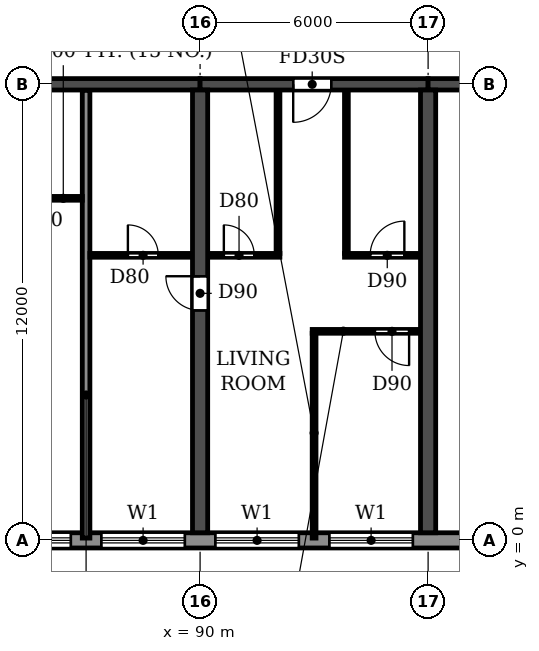
"""IFC4 building model, lengths in metres.
Left out: names, types, materials, properties, quantities, classifications, styles, units other than length and angle.
Written with IfcOpenShell. Run it as: python <this file> out.ifc"""

import sys

from ifc_helpers import new_model, si_unit, direction, frame, frame_2d, origin, place, context, subcontext, project, spatial, rectangle, extrude, element, fill, save


model = new_model("IFC4")
c1 = context("Model", 3, precision=1e-05, world=origin(), true_north=direction((0.0, 1.0)))
c2 = subcontext(c1, "Body", "Model", "MODEL_VIEW")
j1 = project(units=[si_unit("LENGTHUNIT", "METRE"), si_unit("PLANEANGLEUNIT", "RADIAN")], contexts=[c1])
p1 = place(None, origin())
s1 = spatial("IfcSite", under=j1, at=p1, CompositionType="ELEMENT")
p2 = place(p1, origin())
s2 = spatial("IfcBuilding", under=s1, at=p2, CompositionType="ELEMENT")
p3 = place(p2, frame((0.0, 0.0, 33.3)))
s3 = spatial("IfcBuildingStorey", under=s2, at=p3, CompositionType="ELEMENT", Elevation=33.3)
p4 = place(p3, frame((90.0, 0.2, 0.0), z_axis=(0.0, 0.0, 1.0), x_axis=(0.0, 1.0, 0.0)))
e1 = element("IfcWall", 1, at=p4, inside=s3, PredefinedType="SHEAR", context=c2, shape_type="SweptSolid", body=[
    extrude(rectangle(XDim=11.65, YDim=0.4, at=frame_2d((5.825, 0.0))), origin(), (0.0, 0.0, 1.0), 3.05),
])
p5 = place(p4, frame((5.85, 0.0, 0.0)))
e2 = element("IfcOpeningElement", 2, at=p5, cuts=e1, PredefinedType="OPENING", context=c2, shape_type="SweptSolid", body=[
    extrude(rectangle(XDim=0.9, YDim=2.1, at=frame_2d((0.45, 1.05))), frame((0.0, 0.21, 0.0), z_axis=(0.0, -1.0, 0.0), x_axis=(1.0, 0.0, 0.0)), (0.0, 0.0, 1.0), 0.42),
])
p6 = place(p3, frame((96.0, 0.2, 0.0), z_axis=(0.0, 0.0, 1.0), x_axis=(0.0, 1.0, 0.0)))
e3 = element("IfcWall", 3, at=p6, inside=s3, PredefinedType="SHEAR", context=c2, shape_type="SweptSolid", body=[
    extrude(rectangle(XDim=11.65, YDim=0.4, at=frame_2d((5.825, 0.0))), origin(), (0.0, 0.0, 1.0), 3.05),
])
p7 = place(p3, frame((84.0, 12.0, 0.0), z_axis=(0.0, 0.0, 1.0), x_axis=(1.0, 0.0, 0.0)))
e4 = element("IfcWall", 4, at=p7, inside=s3, PredefinedType="SHEAR", context=c2, shape_type="SweptSolid", body=[
    extrude(rectangle(XDim=6.0, YDim=0.3, at=frame_2d((3.0, 0.0))), origin(), (0.0, 0.0, 1.0), 2.45),
])
p8 = place(p3, frame((90.0, 12.0, 0.0), z_axis=(0.0, 0.0, 1.0), x_axis=(1.0, 0.0, 0.0)))
e5 = element("IfcWall", 5, at=p8, inside=s3, PredefinedType="SHEAR", context=c2, shape_type="SweptSolid", body=[
    extrude(rectangle(XDim=6.0, YDim=0.3, at=frame_2d((3.0, 0.0))), origin(), (0.0, 0.0, 1.0), 2.45),
])
p9 = place(p8, frame((2.45, 0.0, 0.0)))
e6 = element("IfcOpeningElement", 6, at=p9, cuts=e5, PredefinedType="OPENING", context=c2, shape_type="SweptSolid", body=[
    extrude(rectangle(XDim=1.0, YDim=2.1, at=frame_2d((0.5, 1.05))), frame((0.0, 0.16, 0.0), z_axis=(0.0, -1.0, 0.0), x_axis=(1.0, 0.0, 0.0)), (0.0, 0.0, 1.0), 0.32),
])
p10 = place(p3, frame((96.0, 12.0, 0.0), z_axis=(0.0, 0.0, 1.0), x_axis=(1.0, 0.0, 0.0)))
e7 = element("IfcWall", 7, at=p10, inside=s3, PredefinedType="SHEAR", context=c2, shape_type="SweptSolid", body=[
    extrude(rectangle(XDim=5.8, YDim=0.3, at=frame_2d((2.9, 0.0))), origin(), (0.0, 0.0, 1.0), 2.45),
])
p11 = place(p10, frame((2.5, 0.0, 0.0)))
e8 = element("IfcOpeningElement", 8, at=p11, cuts=e7, PredefinedType="OPENING", context=c2, shape_type="SweptSolid", body=[
    extrude(rectangle(XDim=1.0, YDim=2.1, at=frame_2d((0.5, 1.05))), frame((0.0, 0.16, 0.0), z_axis=(0.0, -1.0, 0.0), x_axis=(1.0, 0.0, 0.0)), (0.0, 0.0, 1.0), 0.32),
])
p12 = place(p3, frame((4.683, 0.0, 0.0), z_axis=(0.0, 0.0, 1.0), x_axis=(1.0, 0.0, 0.0)))
e9 = element("IfcWall", 9, at=p12, inside=s3, PredefinedType="STANDARD", context=c2, shape_type="SweptSolid", body=[
    extrude(rectangle(XDim=92.634, YDim=0.4, at=frame_2d((46.317, 0.0))), origin(), (0.0, 0.0, 1.0), 3.05),
])
p13 = place(p12, frame((1.717, 0.0, 0.9)))
e10 = element("IfcOpeningElement", 10, at=p13, cuts=e9, PredefinedType="OPENING", context=c2, shape_type="SweptSolid", body=[
    extrude(rectangle(XDim=2.2, YDim=1.5, at=frame_2d((1.1, 0.75))), frame((0.0, 0.21, 0.0), z_axis=(0.0, -1.0, 0.0), x_axis=(1.0, 0.0, 0.0)), (0.0, 0.0, 1.0), 0.42),
])
p14 = place(p12, frame((4.717, 0.0, 0.9)))
e11 = element("IfcOpeningElement", 11, at=p14, cuts=e9, PredefinedType="OPENING", context=c2, shape_type="SweptSolid", body=[
    extrude(rectangle(XDim=2.2, YDim=1.5, at=frame_2d((1.1, 0.75))), frame((0.0, 0.21, 0.0), z_axis=(0.0, -1.0, 0.0), x_axis=(1.0, 0.0, 0.0)), (0.0, 0.0, 1.0), 0.42),
])
p15 = place(p12, frame((7.917, 0.0, 0.0)))
e12 = element("IfcOpeningElement", 12, at=p15, cuts=e9, PredefinedType="OPENING", context=c2, shape_type="SweptSolid", body=[
    extrude(rectangle(XDim=1.8, YDim=2.4, at=frame_2d((0.9, 1.2))), frame((0.0, 0.21, 0.0), z_axis=(0.0, -1.0, 0.0), x_axis=(1.0, 0.0, 0.0)), (0.0, 0.0, 1.0), 0.42),
])
p16 = place(p12, frame((10.717, 0.0, 0.9)))
e13 = element("IfcOpeningElement", 13, at=p16, cuts=e9, PredefinedType="OPENING", context=c2, shape_type="SweptSolid", body=[
    extrude(rectangle(XDim=2.2, YDim=1.5, at=frame_2d((1.1, 0.75))), frame((0.0, 0.21, 0.0), z_axis=(0.0, -1.0, 0.0), x_axis=(1.0, 0.0, 0.0)), (0.0, 0.0, 1.0), 0.42),
])
p17 = place(p12, frame((13.717, 0.0, 0.9)))
e14 = element("IfcOpeningElement", 14, at=p17, cuts=e9, PredefinedType="OPENING", context=c2, shape_type="SweptSolid", body=[
    extrude(rectangle(XDim=2.2, YDim=1.5, at=frame_2d((1.1, 0.75))), frame((0.0, 0.21, 0.0), z_axis=(0.0, -1.0, 0.0), x_axis=(1.0, 0.0, 0.0)), (0.0, 0.0, 1.0), 0.42),
])
p18 = place(p12, frame((16.717, 0.0, 0.9)))
e15 = element("IfcOpeningElement", 15, at=p18, cuts=e9, PredefinedType="OPENING", context=c2, shape_type="SweptSolid", body=[
    extrude(rectangle(XDim=2.2, YDim=1.5, at=frame_2d((1.1, 0.75))), frame((0.0, 0.21, 0.0), z_axis=(0.0, -1.0, 0.0), x_axis=(1.0, 0.0, 0.0)), (0.0, 0.0, 1.0), 0.42),
])
p19 = place(p12, frame((19.717, 0.0, 0.9)))
e16 = element("IfcOpeningElement", 16, at=p19, cuts=e9, PredefinedType="OPENING", context=c2, shape_type="SweptSolid", body=[
    extrude(rectangle(XDim=2.2, YDim=1.5, at=frame_2d((1.1, 0.75))), frame((0.0, 0.21, 0.0), z_axis=(0.0, -1.0, 0.0), x_axis=(1.0, 0.0, 0.0)), (0.0, 0.0, 1.0), 0.42),
])
p20 = place(p12, frame((22.917, 0.0, 0.0)))
e17 = element("IfcOpeningElement", 17, at=p20, cuts=e9, PredefinedType="OPENING", context=c2, shape_type="SweptSolid", body=[
    extrude(rectangle(XDim=1.8, YDim=2.4, at=frame_2d((0.9, 1.2))), frame((0.0, 0.21, 0.0), z_axis=(0.0, -1.0, 0.0), x_axis=(1.0, 0.0, 0.0)), (0.0, 0.0, 1.0), 0.42),
])
p21 = place(p12, frame((25.717, 0.0, 0.9)))
e18 = element("IfcOpeningElement", 18, at=p21, cuts=e9, PredefinedType="OPENING", context=c2, shape_type="SweptSolid", body=[
    extrude(rectangle(XDim=2.2, YDim=1.5, at=frame_2d((1.1, 0.75))), frame((0.0, 0.21, 0.0), z_axis=(0.0, -1.0, 0.0), x_axis=(1.0, 0.0, 0.0)), (0.0, 0.0, 1.0), 0.42),
])
p22 = place(p12, frame((28.717, 0.0, 0.9)))
e19 = element("IfcOpeningElement", 19, at=p22, cuts=e9, PredefinedType="OPENING", context=c2, shape_type="SweptSolid", body=[
    extrude(rectangle(XDim=2.2, YDim=1.5, at=frame_2d((1.1, 0.75))), frame((0.0, 0.21, 0.0), z_axis=(0.0, -1.0, 0.0), x_axis=(1.0, 0.0, 0.0)), (0.0, 0.0, 1.0), 0.42),
])
p23 = place(p12, frame((31.717, 0.0, 0.9)))
e20 = element("IfcOpeningElement", 20, at=p23, cuts=e9, PredefinedType="OPENING", context=c2, shape_type="SweptSolid", body=[
    extrude(rectangle(XDim=2.2, YDim=1.5, at=frame_2d((1.1, 0.75))), frame((0.0, 0.21, 0.0), z_axis=(0.0, -1.0, 0.0), x_axis=(1.0, 0.0, 0.0)), (0.0, 0.0, 1.0), 0.42),
])
p24 = place(p12, frame((34.717, 0.0, 0.9)))
e21 = element("IfcOpeningElement", 21, at=p24, cuts=e9, PredefinedType="OPENING", context=c2, shape_type="SweptSolid", body=[
    extrude(rectangle(XDim=2.2, YDim=1.5, at=frame_2d((1.1, 0.75))), frame((0.0, 0.21, 0.0), z_axis=(0.0, -1.0, 0.0), x_axis=(1.0, 0.0, 0.0)), (0.0, 0.0, 1.0), 0.42),
])
p25 = place(p12, frame((37.717, 0.0, 0.9)))
e22 = element("IfcOpeningElement", 22, at=p25, cuts=e9, PredefinedType="OPENING", context=c2, shape_type="SweptSolid", body=[
    extrude(rectangle(XDim=2.2, YDim=1.5, at=frame_2d((1.1, 0.75))), frame((0.0, 0.21, 0.0), z_axis=(0.0, -1.0, 0.0), x_axis=(1.0, 0.0, 0.0)), (0.0, 0.0, 1.0), 0.42),
])
p26 = place(p12, frame((40.717, 0.0, 0.9)))
e23 = element("IfcOpeningElement", 23, at=p26, cuts=e9, PredefinedType="OPENING", context=c2, shape_type="SweptSolid", body=[
    extrude(rectangle(XDim=2.2, YDim=1.5, at=frame_2d((1.1, 0.75))), frame((0.0, 0.21, 0.0), z_axis=(0.0, -1.0, 0.0), x_axis=(1.0, 0.0, 0.0)), (0.0, 0.0, 1.0), 0.42),
])
p27 = place(p12, frame((43.717, 0.0, 0.9)))
e24 = element("IfcOpeningElement", 24, at=p27, cuts=e9, PredefinedType="OPENING", context=c2, shape_type="SweptSolid", body=[
    extrude(rectangle(XDim=2.2, YDim=1.5, at=frame_2d((1.1, 0.75))), frame((0.0, 0.21, 0.0), z_axis=(0.0, -1.0, 0.0), x_axis=(1.0, 0.0, 0.0)), (0.0, 0.0, 1.0), 0.42),
])
p28 = place(p12, frame((46.917, 0.0, 0.0)))
e25 = element("IfcOpeningElement", 25, at=p28, cuts=e9, PredefinedType="OPENING", context=c2, shape_type="SweptSolid", body=[
    extrude(rectangle(XDim=1.8, YDim=2.4, at=frame_2d((0.9, 1.2))), frame((0.0, 0.21, 0.0), z_axis=(0.0, -1.0, 0.0), x_axis=(1.0, 0.0, 0.0)), (0.0, 0.0, 1.0), 0.42),
])
p29 = place(p12, frame((49.717, 0.0, 0.9)))
e26 = element("IfcOpeningElement", 26, at=p29, cuts=e9, PredefinedType="OPENING", context=c2, shape_type="SweptSolid", body=[
    extrude(rectangle(XDim=2.2, YDim=1.5, at=frame_2d((1.1, 0.75))), frame((0.0, 0.21, 0.0), z_axis=(0.0, -1.0, 0.0), x_axis=(1.0, 0.0, 0.0)), (0.0, 0.0, 1.0), 0.42),
])
p30 = place(p12, frame((52.717, 0.0, 0.9)))
e27 = element("IfcOpeningElement", 27, at=p30, cuts=e9, PredefinedType="OPENING", context=c2, shape_type="SweptSolid", body=[
    extrude(rectangle(XDim=2.2, YDim=1.5, at=frame_2d((1.1, 0.75))), frame((0.0, 0.21, 0.0), z_axis=(0.0, -1.0, 0.0), x_axis=(1.0, 0.0, 0.0)), (0.0, 0.0, 1.0), 0.42),
])
p31 = place(p12, frame((55.717, 0.0, 0.9)))
e28 = element("IfcOpeningElement", 28, at=p31, cuts=e9, PredefinedType="OPENING", context=c2, shape_type="SweptSolid", body=[
    extrude(rectangle(XDim=2.2, YDim=1.5, at=frame_2d((1.1, 0.75))), frame((0.0, 0.21, 0.0), z_axis=(0.0, -1.0, 0.0), x_axis=(1.0, 0.0, 0.0)), (0.0, 0.0, 1.0), 0.42),
])
p32 = place(p12, frame((58.917, 0.0, 0.0)))
e29 = element("IfcOpeningElement", 29, at=p32, cuts=e9, PredefinedType="OPENING", context=c2, shape_type="SweptSolid", body=[
    extrude(rectangle(XDim=1.8, YDim=2.4, at=frame_2d((0.9, 1.2))), frame((0.0, 0.21, 0.0), z_axis=(0.0, -1.0, 0.0), x_axis=(1.0, 0.0, 0.0)), (0.0, 0.0, 1.0), 0.42),
])
p33 = place(p12, frame((61.717, 0.0, 0.9)))
e30 = element("IfcOpeningElement", 30, at=p33, cuts=e9, PredefinedType="OPENING", context=c2, shape_type="SweptSolid", body=[
    extrude(rectangle(XDim=2.2, YDim=1.5, at=frame_2d((1.1, 0.75))), frame((0.0, 0.21, 0.0), z_axis=(0.0, -1.0, 0.0), x_axis=(1.0, 0.0, 0.0)), (0.0, 0.0, 1.0), 0.42),
])
p34 = place(p12, frame((64.717, 0.0, 0.9)))
e31 = element("IfcOpeningElement", 31, at=p34, cuts=e9, PredefinedType="OPENING", context=c2, shape_type="SweptSolid", body=[
    extrude(rectangle(XDim=2.2, YDim=1.5, at=frame_2d((1.1, 0.75))), frame((0.0, 0.21, 0.0), z_axis=(0.0, -1.0, 0.0), x_axis=(1.0, 0.0, 0.0)), (0.0, 0.0, 1.0), 0.42),
])
p35 = place(p12, frame((67.717, 0.0, 0.9)))
e32 = element("IfcOpeningElement", 32, at=p35, cuts=e9, PredefinedType="OPENING", context=c2, shape_type="SweptSolid", body=[
    extrude(rectangle(XDim=2.2, YDim=1.5, at=frame_2d((1.1, 0.75))), frame((0.0, 0.21, 0.0), z_axis=(0.0, -1.0, 0.0), x_axis=(1.0, 0.0, 0.0)), (0.0, 0.0, 1.0), 0.42),
])
p36 = place(p12, frame((70.917, 0.0, 0.0)))
e33 = element("IfcOpeningElement", 33, at=p36, cuts=e9, PredefinedType="OPENING", context=c2, shape_type="SweptSolid", body=[
    extrude(rectangle(XDim=1.8, YDim=2.4, at=frame_2d((0.9, 1.2))), frame((0.0, 0.21, 0.0), z_axis=(0.0, -1.0, 0.0), x_axis=(1.0, 0.0, 0.0)), (0.0, 0.0, 1.0), 0.42),
])
p37 = place(p12, frame((73.717, 0.0, 0.9)))
e34 = element("IfcOpeningElement", 34, at=p37, cuts=e9, PredefinedType="OPENING", context=c2, shape_type="SweptSolid", body=[
    extrude(rectangle(XDim=2.2, YDim=1.5, at=frame_2d((1.1, 0.75))), frame((0.0, 0.21, 0.0), z_axis=(0.0, -1.0, 0.0), x_axis=(1.0, 0.0, 0.0)), (0.0, 0.0, 1.0), 0.42),
])
p38 = place(p12, frame((76.717, 0.0, 0.9)))
e35 = element("IfcOpeningElement", 35, at=p38, cuts=e9, PredefinedType="OPENING", context=c2, shape_type="SweptSolid", body=[
    extrude(rectangle(XDim=2.2, YDim=1.5, at=frame_2d((1.1, 0.75))), frame((0.0, 0.21, 0.0), z_axis=(0.0, -1.0, 0.0), x_axis=(1.0, 0.0, 0.0)), (0.0, 0.0, 1.0), 0.42),
])
p39 = place(p12, frame((79.717, 0.0, 0.9)))
e36 = element("IfcOpeningElement", 36, at=p39, cuts=e9, PredefinedType="OPENING", context=c2, shape_type="SweptSolid", body=[
    extrude(rectangle(XDim=2.2, YDim=1.5, at=frame_2d((1.1, 0.75))), frame((0.0, 0.21, 0.0), z_axis=(0.0, -1.0, 0.0), x_axis=(1.0, 0.0, 0.0)), (0.0, 0.0, 1.0), 0.42),
])
p40 = place(p12, frame((82.717, 0.0, 0.9)))
e37 = element("IfcOpeningElement", 37, at=p40, cuts=e9, PredefinedType="OPENING", context=c2, shape_type="SweptSolid", body=[
    extrude(rectangle(XDim=2.2, YDim=1.5, at=frame_2d((1.1, 0.75))), frame((0.0, 0.21, 0.0), z_axis=(0.0, -1.0, 0.0), x_axis=(1.0, 0.0, 0.0)), (0.0, 0.0, 1.0), 0.42),
])
p41 = place(p12, frame((85.717, 0.0, 0.9)))
e38 = element("IfcOpeningElement", 38, at=p41, cuts=e9, PredefinedType="OPENING", context=c2, shape_type="SweptSolid", body=[
    extrude(rectangle(XDim=2.2, YDim=1.5, at=frame_2d((1.1, 0.75))), frame((0.0, 0.21, 0.0), z_axis=(0.0, -1.0, 0.0), x_axis=(1.0, 0.0, 0.0)), (0.0, 0.0, 1.0), 0.42),
])
p42 = place(p12, frame((88.717, 0.0, 0.9)))
e39 = element("IfcOpeningElement", 39, at=p42, cuts=e9, PredefinedType="OPENING", context=c2, shape_type="SweptSolid", body=[
    extrude(rectangle(XDim=2.2, YDim=1.5, at=frame_2d((1.1, 0.75))), frame((0.0, 0.21, 0.0), z_axis=(0.0, -1.0, 0.0), x_axis=(1.0, 0.0, 0.0)), (0.0, 0.0, 1.0), 0.42),
])
p43 = place(p3, frame((87.0, 0.06, 0.0), z_axis=(0.0, 0.0, 1.0), x_axis=(0.0, 1.0, 0.0)))
e40 = element("IfcWall", 40, at=p43, inside=s3, PredefinedType="PARTITIONING", context=c2, shape_type="SweptSolid", body=[
    extrude(rectangle(XDim=11.78, YDim=0.2, at=frame_2d((5.89, 0.0))), origin(), (0.0, 0.0, 1.0), 3.05),
])
p44 = place(p3, frame((92.95, 5.5, 0.0), z_axis=(0.0, 0.0, 1.0), x_axis=(1.0, 0.0, 0.0)))
e41 = element("IfcWall", 41, at=p44, inside=s3, PredefinedType="PARTITIONING", context=c2, shape_type="SweptSolid", body=[
    extrude(rectangle(XDim=2.84, YDim=0.1, at=frame_2d((1.42, 0.0))), origin(), (0.0, 0.0, 1.0), 3.05),
])
p45 = place(p44, frame((1.65, 0.0, 0.0)))
e42 = element("IfcOpeningElement", 42, at=p45, cuts=e41, PredefinedType="OPENING", context=c2, shape_type="SweptSolid", body=[
    extrude(rectangle(XDim=0.9, YDim=2.1, at=frame_2d((0.45, 1.05))), frame((0.0, 0.06, 0.0), z_axis=(0.0, -1.0, 0.0), x_axis=(1.0, 0.0, 0.0)), (0.0, 0.0, 1.0), 0.12),
])
p46 = place(p3, frame((87.1, 7.5, 0.0), z_axis=(0.0, 0.0, 1.0), x_axis=(1.0, 0.0, 0.0)))
e43 = element("IfcWall", 43, at=p46, inside=s3, PredefinedType="PARTITIONING", context=c2, shape_type="SweptSolid", body=[
    extrude(rectangle(XDim=2.69, YDim=0.1, at=frame_2d((1.345, 0.0))), origin(), (0.0, 0.0, 1.0), 3.05),
])
p47 = place(p46, frame((1.0, 0.0, 0.0)))
e44 = element("IfcOpeningElement", 44, at=p47, cuts=e43, PredefinedType="OPENING", context=c2, shape_type="SweptSolid", body=[
    extrude(rectangle(XDim=0.8, YDim=2.1, at=frame_2d((0.4, 1.05))), frame((0.0, 0.06, 0.0), z_axis=(0.0, -1.0, 0.0), x_axis=(1.0, 0.0, 0.0)), (0.0, 0.0, 1.0), 0.12),
])
p48 = place(p3, frame((90.21, 7.5, 0.0), z_axis=(0.0, 0.0, 1.0), x_axis=(1.0, 0.0, 0.0)))
e45 = element("IfcWall", 45, at=p48, inside=s3, PredefinedType="PARTITIONING", context=c2, shape_type="SweptSolid", body=[
    extrude(rectangle(XDim=1.89, YDim=0.1, at=frame_2d((0.945, 0.0))), origin(), (0.0, 0.0, 1.0), 3.05),
])
p49 = place(p48, frame((0.415, 0.0, 0.0)))
e46 = element("IfcOpeningElement", 46, at=p49, cuts=e45, PredefinedType="OPENING", context=c2, shape_type="SweptSolid", body=[
    extrude(rectangle(XDim=0.8, YDim=2.1, at=frame_2d((0.4, 1.05))), frame((0.0, 0.06, 0.0), z_axis=(0.0, -1.0, 0.0), x_axis=(1.0, 0.0, 0.0)), (0.0, 0.0, 1.0), 0.12),
])
p50 = place(p3, frame((93.8, 7.5, 0.0), z_axis=(0.0, 0.0, 1.0), x_axis=(1.0, 0.0, 0.0)))
e47 = element("IfcWall", 47, at=p50, inside=s3, PredefinedType="PARTITIONING", context=c2, shape_type="SweptSolid", body=[
    extrude(rectangle(XDim=1.99, YDim=0.1, at=frame_2d((0.995, 0.0))), origin(), (0.0, 0.0, 1.0), 3.05),
])
p51 = place(p50, frame((0.675, 0.0, 0.0)))
e48 = element("IfcOpeningElement", 48, at=p51, cuts=e47, PredefinedType="OPENING", context=c2, shape_type="SweptSolid", body=[
    extrude(rectangle(XDim=0.9, YDim=2.1, at=frame_2d((0.45, 1.05))), frame((0.0, 0.06, 0.0), z_axis=(0.0, -1.0, 0.0), x_axis=(1.0, 0.0, 0.0)), (0.0, 0.0, 1.0), 0.12),
])
p52 = place(p3, frame((84.21, 9.0, 0.0), z_axis=(0.0, 0.0, 1.0), x_axis=(1.0, 0.0, 0.0)))
e49 = element("IfcWall", 49, at=p52, inside=s3, PredefinedType="PARTITIONING", context=c2, shape_type="SweptSolid", body=[
    extrude(rectangle(XDim=2.69, YDim=0.1, at=frame_2d((1.345, 0.0))), origin(), (0.0, 0.0, 1.0), 3.05),
])
p53 = place(p52, frame((0.89, 0.0, 0.0)))
e50 = element("IfcOpeningElement", 50, at=p53, cuts=e49, PredefinedType="OPENING", context=c2, shape_type="SweptSolid", body=[
    extrude(rectangle(XDim=0.8, YDim=2.1, at=frame_2d((0.4, 1.05))), frame((0.0, 0.06, 0.0), z_axis=(0.0, -1.0, 0.0), x_axis=(1.0, 0.0, 0.0)), (0.0, 0.0, 1.0), 0.12),
])
p54 = place(p3, frame((92.05, 7.55, 0.0), z_axis=(0.0, 0.0, 1.0), x_axis=(0.0, 1.0, 0.0)))
e51 = element("IfcWall", 51, at=p54, inside=s3, PredefinedType="PARTITIONING", context=c2, shape_type="SweptSolid", body=[
    extrude(rectangle(XDim=4.29, YDim=0.1, at=frame_2d((2.145, 0.0))), origin(), (0.0, 0.0, 1.0), 3.05),
])
p55 = place(p3, frame((93.0, 0.06, 0.0), z_axis=(0.0, 0.0, 1.0), x_axis=(0.0, 1.0, 0.0)))
e52 = element("IfcWall", 52, at=p55, inside=s3, PredefinedType="PARTITIONING", context=c2, shape_type="SweptSolid", body=[
    extrude(rectangle(XDim=5.39, YDim=0.1, at=frame_2d((2.695, 0.0))), origin(), (0.0, 0.0, 1.0), 3.05),
])
p56 = place(p3, frame((93.85, 7.55, 0.0), z_axis=(0.0, 0.0, 1.0), x_axis=(0.0, 1.0, 0.0)))
e53 = element("IfcWall", 53, at=p56, inside=s3, PredefinedType="PARTITIONING", context=c2, shape_type="SweptSolid", body=[
    extrude(rectangle(XDim=4.29, YDim=0.1, at=frame_2d((2.145, 0.0))), origin(), (0.0, 0.0, 1.0), 3.05),
])
p57 = place(p39, origin())
e54 = element("IfcWindow", 54, at=p57, inside=s3, PartitioningType="DOUBLE_PANEL_HORIZONTAL", PredefinedType="WINDOW", context=c2, shape_type="SweptSolid", body=[
    extrude(rectangle(XDim=2.2, YDim=1.5, at=frame_2d((1.1, 0.75))), frame((0.0, 0.03, 0.0), z_axis=(0.0, -1.0, 0.0), x_axis=(1.0, 0.0, 0.0)), (0.0, 0.0, 1.0), 0.06),
])
fill(e36, e54)
p58 = place(p40, origin())
e55 = element("IfcWindow", 55, at=p58, inside=s3, PartitioningType="DOUBLE_PANEL_HORIZONTAL", PredefinedType="WINDOW", context=c2, shape_type="SweptSolid", body=[
    extrude(rectangle(XDim=2.2, YDim=1.5, at=frame_2d((1.1, 0.75))), frame((0.0, 0.03, 0.0), z_axis=(0.0, -1.0, 0.0), x_axis=(1.0, 0.0, 0.0)), (0.0, 0.0, 1.0), 0.06),
])
fill(e37, e55)
p59 = place(p41, origin())
e56 = element("IfcWindow", 56, at=p59, inside=s3, PartitioningType="DOUBLE_PANEL_HORIZONTAL", PredefinedType="WINDOW", context=c2, shape_type="SweptSolid", body=[
    extrude(rectangle(XDim=2.2, YDim=1.5, at=frame_2d((1.1, 0.75))), frame((0.0, 0.03, 0.0), z_axis=(0.0, -1.0, 0.0), x_axis=(1.0, 0.0, 0.0)), (0.0, 0.0, 1.0), 0.06),
])
fill(e38, e56)
p60 = place(p42, origin())
e57 = element("IfcWindow", 57, at=p60, inside=s3, PartitioningType="DOUBLE_PANEL_HORIZONTAL", PredefinedType="WINDOW", context=c2, shape_type="SweptSolid", body=[
    extrude(rectangle(XDim=2.2, YDim=1.5, at=frame_2d((1.1, 0.75))), frame((0.0, 0.03, 0.0), z_axis=(0.0, -1.0, 0.0), x_axis=(1.0, 0.0, 0.0)), (0.0, 0.0, 1.0), 0.06),
])
fill(e39, e57)
p61 = place(p47, origin())
e58 = element("IfcDoor", 58, at=p61, inside=s3, OperationType="SINGLE_SWING_LEFT", PredefinedType="DOOR", context=c2, shape_type="SweptSolid", body=[
    extrude(rectangle(XDim=0.8, YDim=2.1, at=frame_2d((0.4, 1.05))), frame((0.0, 0.025, 0.0), z_axis=(0.0, -1.0, 0.0), x_axis=(1.0, 0.0, 0.0)), (0.0, 0.0, 1.0), 0.05),
])
fill(e44, e58)
p62 = place(p5, origin())
e59 = element("IfcDoor", 59, at=p62, inside=s3, OperationType="SINGLE_SWING_RIGHT", PredefinedType="DOOR", context=c2, shape_type="SweptSolid", body=[
    extrude(rectangle(XDim=0.9, YDim=2.1, at=frame_2d((0.45, 1.05))), frame((0.0, 0.025, 0.0), z_axis=(0.0, -1.0, 0.0), x_axis=(1.0, 0.0, 0.0)), (0.0, 0.0, 1.0), 0.05),
])
fill(e2, e59)
p63 = place(p49, origin())
e60 = element("IfcDoor", 60, at=p63, inside=s3, OperationType="SINGLE_SWING_LEFT", PredefinedType="DOOR", context=c2, shape_type="SweptSolid", body=[
    extrude(rectangle(XDim=0.8, YDim=2.1, at=frame_2d((0.4, 1.05))), frame((0.0, 0.025, 0.0), z_axis=(0.0, -1.0, 0.0), x_axis=(1.0, 0.0, 0.0)), (0.0, 0.0, 1.0), 0.05),
])
fill(e46, e60)
p64 = place(p9, frame((1.0, 0.0, 0.0), z_axis=(0.0, 0.0, 1.0), x_axis=(-1.0, 0.0, 0.0)))
e61 = element("IfcDoor", 61, at=p64, inside=s3, OperationType="SINGLE_SWING_RIGHT", PredefinedType="DOOR", context=c2, shape_type="SweptSolid", body=[
    extrude(rectangle(XDim=1.0, YDim=2.1, at=frame_2d((0.5, 1.05))), frame((0.0, 0.025, 0.0), z_axis=(0.0, -1.0, 0.0), x_axis=(1.0, 0.0, 0.0)), (0.0, 0.0, 1.0), 0.05),
])
fill(e6, e61)
p65 = place(p51, origin())
e62 = element("IfcDoor", 62, at=p65, inside=s3, OperationType="SINGLE_SWING_RIGHT", PredefinedType="DOOR", context=c2, shape_type="SweptSolid", body=[
    extrude(rectangle(XDim=0.9, YDim=2.1, at=frame_2d((0.45, 1.05))), frame((0.0, 0.025, 0.0), z_axis=(0.0, -1.0, 0.0), x_axis=(1.0, 0.0, 0.0)), (0.0, 0.0, 1.0), 0.05),
])
fill(e48, e62)
p66 = place(p45, frame((0.9, 0.0, 0.0), z_axis=(0.0, 0.0, 1.0), x_axis=(-1.0, 0.0, 0.0)))
e63 = element("IfcDoor", 63, at=p66, inside=s3, OperationType="SINGLE_SWING_LEFT", PredefinedType="DOOR", context=c2, shape_type="SweptSolid", body=[
    extrude(rectangle(XDim=0.9, YDim=2.1, at=frame_2d((0.45, 1.05))), frame((0.0, 0.025, 0.0), z_axis=(0.0, -1.0, 0.0), x_axis=(1.0, 0.0, 0.0)), (0.0, 0.0, 1.0), 0.05),
])
fill(e42, e63)
save(model, sys.argv[1])
